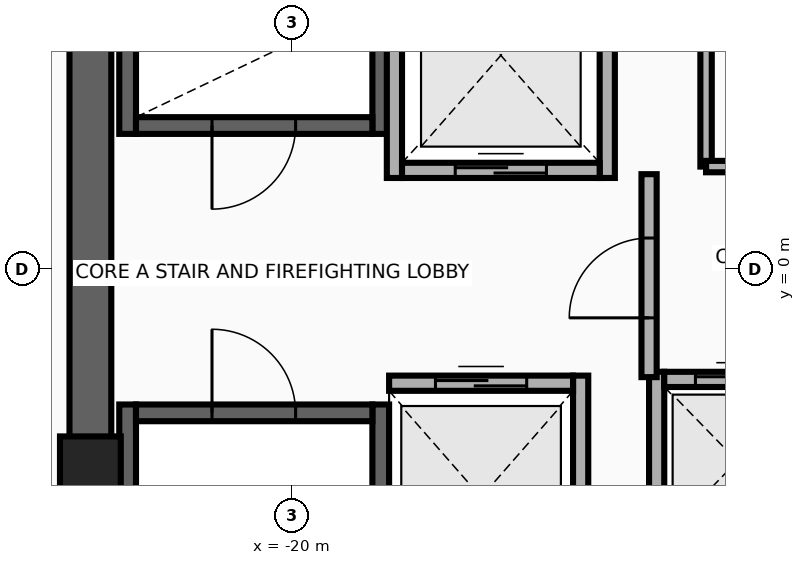
"""IFC4 building model, lengths in metres.
Left out: names, types, materials, properties, quantities, classifications, styles, units other than length and angle.
Written with IfcOpenShell. Run it as: python <this file> out.ifc"""

import sys

from ifc_helpers import new_model, si_unit, direction, frame, frame_2d, origin, origin_2d, place, context, subcontext, project, spatial, rectangle, extrude, source, transform, mapped, element, fill, save


model = new_model("IFC4")
c1 = context("Model", 3, precision=1e-05, world=origin(), true_north=direction((0.0, 1.0)))
c2 = subcontext(c1, "Body", "Model", "MODEL_VIEW")
j1 = project(units=[si_unit("LENGTHUNIT", "METRE"), si_unit("PLANEANGLEUNIT", "RADIAN")], contexts=[c1])
p1 = place(None, origin())
s1 = spatial("IfcSite", under=j1, at=p1, CompositionType="ELEMENT")
p2 = place(p1, origin())
s2 = spatial("IfcBuilding", under=s1, at=p2, CompositionType="ELEMENT")
p3 = place(p2, frame((0.0, 0.0, 280.0)))
s3 = spatial("IfcBuildingStorey", under=s2, at=p3, CompositionType="ELEMENT", Elevation=280.0)
for number, where, z_axis, x_axis in (
    (1, (-22.16, 1.78, 0.0), (0.0, 0.0, 1.0), (0.0, 1.0, 0.0)),
    (2, (-18.83, 1.78, 0.0), (0.0, 0.0, 1.0), (0.0, 1.0, 0.0)),
):
    element("IfcWall", number, at=place(p3, frame(where, z_axis=z_axis, x_axis=x_axis)), inside=s3, PredefinedType="SHEAR", context=c2, shape_type="SweptSolid", body=[
        extrude(rectangle(XDim=8.745, YDim=0.22, at=frame_2d((4.373, 0.0))), origin(), (0.0, 0.0, 1.0), 3.26),
    ])
p4 = place(p3, frame((-22.05, 1.89, 0.0), z_axis=(0.0, 0.0, 1.0), x_axis=(1.0, 0.0, 0.0)))
e3 = element("IfcWall", 3, at=p4, inside=s3, PredefinedType="SHEAR", context=c2, shape_type="SweptSolid", body=[
    extrude(rectangle(XDim=3.11, YDim=0.22, at=frame_2d((1.555, 0.0))), origin(), (0.0, 0.0, 1.0), 3.26),
])
p5 = place(p4, frame((1.0, 0.0, 0.0)))
e4 = element("IfcOpeningElement", 4, at=p5, cuts=e3, PredefinedType="OPENING", context=c2, shape_type="SweptSolid", body=[
    extrude(rectangle(XDim=1.1, YDim=2.15, at=frame_2d((0.55, 1.075))), frame((0.0, 0.125, 0.0), z_axis=(0.0, -1.0, 0.0), x_axis=(1.0, 0.0, 0.0)), (0.0, 0.0, 1.0), 0.25),
])
for number, where, z_axis, x_axis in (
    (5, (-22.16, -10.525, 0.0), (0.0, 0.0, 1.0), (0.0, 1.0, 0.0)),
    (6, (-18.83, -10.525, 0.0), (0.0, 0.0, 1.0), (0.0, 1.0, 0.0)),
):
    element("IfcWall", number, at=place(p3, frame(where, z_axis=z_axis, x_axis=x_axis)), inside=s3, PredefinedType="SHEAR", context=c2, shape_type="SweptSolid", body=[
        extrude(rectangle(XDim=8.745, YDim=0.22, at=frame_2d((4.373, 0.0))), origin(), (0.0, 0.0, 1.0), 3.26),
    ])
p6 = place(p3, frame((-22.05, -1.89, 0.0), z_axis=(0.0, 0.0, 1.0), x_axis=(1.0, 0.0, 0.0)))
e7 = element("IfcWall", 7, at=p6, inside=s3, PredefinedType="SHEAR", context=c2, shape_type="SweptSolid", body=[
    extrude(rectangle(XDim=3.11, YDim=0.22, at=frame_2d((1.555, 0.0))), origin(), (0.0, 0.0, 1.0), 3.26),
])
p7 = place(p6, frame((1.0, 0.0, 0.0)))
e8 = element("IfcOpeningElement", 8, at=p7, cuts=e7, PredefinedType="OPENING", context=c2, shape_type="SweptSolid", body=[
    extrude(rectangle(XDim=1.1, YDim=2.15, at=frame_2d((0.55, 1.075))), frame((0.0, 0.125, 0.0), z_axis=(0.0, -1.0, 0.0), x_axis=(1.0, 0.0, 0.0)), (0.0, 0.0, 1.0), 0.25),
])
p8 = place(p3, frame((-22.65, -11.075, 0.0), z_axis=(0.0, 0.0, 1.0), x_axis=(0.0, 1.0, 0.0)))
e9 = element("IfcWall", 9, at=p8, inside=s3, PredefinedType="SHEAR", context=c2, shape_type="SweptSolid", body=[
    extrude(rectangle(XDim=22.15, YDim=0.55, at=frame_2d((11.075, 0.0))), origin(), (0.0, 0.0, 1.0), 3.26),
])
m1 = source(origin(), c2, "Body", "SweptSolid", [
    extrude(rectangle(XDim=0.8, YDim=0.8, at=origin_2d()), origin(), (0.0, 0.0, 1.0), 3.5),
])
p9 = place(p3, frame((-22.65, -2.6, 0.0), z_axis=(0.0, 0.0, 1.0), x_axis=(1.0, 0.0, 0.0)))
e10 = element("IfcColumn", 10, at=p9, inside=s3, PredefinedType="COLUMN", context=c2, shape_type="MappedRepresentation", body=[
    mapped(m1, transform((0.0, 0.0, 0.0), x_axis=(1.0, 0.0, 0.0), y_axis=(0.0, 1.0, 0.0), z_axis=(0.0, 0.0, 1.0), scale=1.0)),
])
for number, where, z_axis, x_axis in (
    (11, (-18.65, 1.2, 0.0), (0.0, 0.0, 1.0), (0.0, 1.0, 0.0)),
    (12, (-15.85, 1.2, 0.0), (0.0, 0.0, 1.0), (0.0, 1.0, 0.0)),
):
    element("IfcWall", number, at=place(p3, frame(where, z_axis=z_axis, x_axis=x_axis)), inside=s3, PredefinedType="MOVABLE", context=c2, shape_type="SweptSolid", body=[
        extrude(rectangle(XDim=3.225, YDim=0.2, at=frame_2d((1.613, 0.0))), origin(), (0.0, 0.0, 1.0), 3.26),
    ])
p10 = place(p3, frame((-18.55, 1.3, 0.0), z_axis=(0.0, 0.0, 1.0), x_axis=(1.0, 0.0, 0.0)))
e13 = element("IfcWall", 13, at=p10, inside=s3, PredefinedType="MOVABLE", context=c2, shape_type="SweptSolid", body=[
    extrude(rectangle(XDim=2.6, YDim=0.2, at=frame_2d((1.3, 0.0))), origin(), (0.0, 0.0, 1.0), 3.26),
])
p11 = place(p10, frame((0.7, 0.0, 0.0)))
e14 = element("IfcOpeningElement", 14, at=p11, cuts=e13, PredefinedType="OPENING", context=c2, shape_type="SweptSolid", body=[
    extrude(rectangle(XDim=1.2, YDim=2.1, at=frame_2d((0.6, 1.05))), frame((0.0, 0.115, 0.0), z_axis=(0.0, -1.0, 0.0), x_axis=(1.0, 0.0, 0.0)), (0.0, 0.0, 1.0), 0.23),
])
p12 = place(p3, frame((-16.2, -4.6, 0.0), z_axis=(0.0, 0.0, 1.0), x_axis=(0.0, 1.0, 0.0)))
e15 = element("IfcWall", 15, at=p12, inside=s3, PredefinedType="MOVABLE", context=c2, shape_type="SweptSolid", body=[
    extrude(rectangle(XDim=3.2, YDim=0.2, at=frame_2d((1.6, 0.0))), origin(), (0.0, 0.0, 1.0), 3.26),
])
p13 = place(p3, frame((-18.72, -1.5, 0.0), z_axis=(0.0, 0.0, 1.0), x_axis=(1.0, 0.0, 0.0)))
e16 = element("IfcWall", 16, at=p13, inside=s3, PredefinedType="MOVABLE", context=c2, shape_type="SweptSolid", body=[
    extrude(rectangle(XDim=2.42, YDim=0.2, at=frame_2d((1.21, 0.0))), origin(), (0.0, 0.0, 1.0), 3.26),
])
p14 = place(p13, frame((0.61, 0.0, 0.0)))
e17 = element("IfcOpeningElement", 17, at=p14, cuts=e16, PredefinedType="OPENING", context=c2, shape_type="SweptSolid", body=[
    extrude(rectangle(XDim=1.2, YDim=2.1, at=frame_2d((0.6, 1.05))), frame((0.0, 0.115, 0.0), z_axis=(0.0, -1.0, 0.0), x_axis=(1.0, 0.0, 0.0)), (0.0, 0.0, 1.0), 0.23),
])
p15 = place(p3, frame((-15.2, -3.7, 0.0), z_axis=(0.0, 0.0, 1.0), x_axis=(0.0, 1.0, 0.0)))
e18 = element("IfcWall", 18, at=p15, inside=s3, PredefinedType="MOVABLE", context=c2, shape_type="SweptSolid", body=[
    extrude(rectangle(XDim=2.35, YDim=0.2, at=frame_2d((1.175, 0.0))), origin(), (0.0, 0.0, 1.0), 3.26),
])
p16 = place(p3, frame((-15.1, -1.45, 0.0), z_axis=(0.0, 0.0, 1.0), x_axis=(1.0, 0.0, 0.0)))
e19 = element("IfcWall", 19, at=p16, inside=s3, PredefinedType="MOVABLE", context=c2, shape_type="SweptSolid", body=[
    extrude(rectangle(XDim=1.92, YDim=0.2, at=frame_2d((0.96, 0.0))), origin(), (0.0, 0.0, 1.0), 3.26),
])
p17 = place(p16, frame((0.41, 0.0, 0.0)))
e20 = element("IfcOpeningElement", 20, at=p17, cuts=e19, PredefinedType="OPENING", context=c2, shape_type="SweptSolid", body=[
    extrude(rectangle(XDim=1.1, YDim=2.1, at=frame_2d((0.55, 1.05))), frame((0.0, 0.115, 0.0), z_axis=(0.0, -1.0, 0.0), x_axis=(1.0, 0.0, 0.0)), (0.0, 0.0, 1.0), 0.23),
])
p18 = place(p3, frame((-15.3, -1.42, 0.0), z_axis=(0.0, 0.0, 1.0), x_axis=(0.0, 1.0, 0.0)))
e21 = element("IfcWall", 21, at=p18, inside=s3, PredefinedType="PARTITIONING", context=c2, shape_type="SweptSolid", body=[
    extrude(rectangle(XDim=2.67, YDim=0.2, at=frame_2d((1.335, 0.0))), origin(), (0.0, 0.0, 1.0), 3.26),
])
p19 = place(p18, frame((0.78, 0.0, 0.0)))
e22 = element("IfcOpeningElement", 22, at=p19, cuts=e21, PredefinedType="OPENING", context=c2, shape_type="SweptSolid", body=[
    extrude(rectangle(XDim=1.05, YDim=2.15, at=frame_2d((0.525, 1.075))), frame((0.0, 0.115, 0.0), z_axis=(0.0, -1.0, 0.0), x_axis=(1.0, 0.0, 0.0)), (0.0, 0.0, 1.0), 0.23),
])
p20 = place(p3, frame((-14.55, 1.35, 0.0), z_axis=(0.0, 0.0, 1.0), x_axis=(0.0, 1.0, 0.0)))
e23 = element("IfcWall", 23, at=p20, inside=s3, PredefinedType="PARTITIONING", context=c2, shape_type="SweptSolid", body=[
    extrude(rectangle(XDim=1.95, YDim=0.15, at=frame_2d((0.975, 0.0))), origin(), (0.0, 0.0, 1.0), 3.26),
])
p21 = place(p3, frame((-14.55, 1.35, 0.0), z_axis=(0.0, 0.0, 1.0), x_axis=(1.0, 0.0, 0.0)))
e24 = element("IfcWall", 24, at=p21, inside=s3, PredefinedType="PARTITIONING", context=c2, shape_type="SweptSolid", body=[
    extrude(rectangle(XDim=1.4, YDim=0.15, at=frame_2d((0.7, 0.0))), origin(), (0.0, 0.0, 1.0), 3.26),
])
p22 = place(p21, frame((0.275, 0.0, 0.0)))
e25 = element("IfcOpeningElement", 25, at=p22, cuts=e24, PredefinedType="OPENING", context=c2, shape_type="SweptSolid", body=[
    extrude(rectangle(XDim=0.85, YDim=2.05, at=frame_2d((0.425, 1.025))), frame((0.0, 0.09, 0.0), z_axis=(0.0, -1.0, 0.0), x_axis=(1.0, 0.0, 0.0)), (0.0, 0.0, 1.0), 0.18),
])
p23 = place(p11, origin())
e26 = element("IfcDoor", 26, at=p23, inside=s3, OperationType="DOUBLE_DOOR_SLIDING", PredefinedType="DOOR", context=c2, shape_type="SweptSolid", body=[
    extrude(rectangle(XDim=1.2, YDim=2.1, at=frame_2d((0.6, 1.05))), frame((0.0, 0.025, 0.0), z_axis=(0.0, -1.0, 0.0), x_axis=(1.0, 0.0, 0.0)), (0.0, 0.0, 1.0), 0.05),
])
fill(e14, e26)
p24 = place(p14, origin())
e27 = element("IfcDoor", 27, at=p24, inside=s3, OperationType="DOUBLE_DOOR_SLIDING", PredefinedType="DOOR", context=c2, shape_type="SweptSolid", body=[
    extrude(rectangle(XDim=1.2, YDim=2.1, at=frame_2d((0.6, 1.05))), frame((0.0, 0.025, 0.0), z_axis=(0.0, -1.0, 0.0), x_axis=(1.0, 0.0, 0.0)), (0.0, 0.0, 1.0), 0.05),
])
fill(e17, e27)
p25 = place(p17, origin())
e28 = element("IfcDoor", 28, at=p25, inside=s3, OperationType="DOUBLE_DOOR_SLIDING", PredefinedType="DOOR", context=c2, shape_type="SweptSolid", body=[
    extrude(rectangle(XDim=1.1, YDim=2.1, at=frame_2d((0.55, 1.05))), frame((0.0, 0.025, 0.0), z_axis=(0.0, -1.0, 0.0), x_axis=(1.0, 0.0, 0.0)), (0.0, 0.0, 1.0), 0.05),
])
fill(e20, e28)
p26 = place(p19, origin())
e29 = element("IfcDoor", 29, at=p26, inside=s3, OperationType="SINGLE_SWING_RIGHT", PredefinedType="DOOR", context=c2, shape_type="SweptSolid", body=[
    extrude(rectangle(XDim=1.05, YDim=2.15, at=frame_2d((0.525, 1.075))), frame((0.0, 0.025, 0.0), z_axis=(0.0, -1.0, 0.0), x_axis=(1.0, 0.0, 0.0)), (0.0, 0.0, 1.0), 0.05),
])
fill(e22, e29)
p27 = place(p5, frame((1.1, 0.0, 0.0), z_axis=(0.0, 0.0, 1.0), x_axis=(-1.0, 0.0, 0.0)))
e30 = element("IfcDoor", 30, at=p27, inside=s3, OperationType="SINGLE_SWING_LEFT", PredefinedType="DOOR", context=c2, shape_type="SweptSolid", body=[
    extrude(rectangle(XDim=1.1, YDim=2.15, at=frame_2d((0.55, 1.075))), frame((0.0, 0.025, 0.0), z_axis=(0.0, -1.0, 0.0), x_axis=(1.0, 0.0, 0.0)), (0.0, 0.0, 1.0), 0.05),
])
fill(e4, e30)
p28 = place(p7, origin())
e31 = element("IfcDoor", 31, at=p28, inside=s3, OperationType="SINGLE_SWING_RIGHT", PredefinedType="DOOR", context=c2, shape_type="SweptSolid", body=[
    extrude(rectangle(XDim=1.1, YDim=2.15, at=frame_2d((0.55, 1.075))), frame((0.0, 0.025, 0.0), z_axis=(0.0, -1.0, 0.0), x_axis=(1.0, 0.0, 0.0)), (0.0, 0.0, 1.0), 0.05),
])
fill(e8, e31)
save(model, sys.argv[1])
